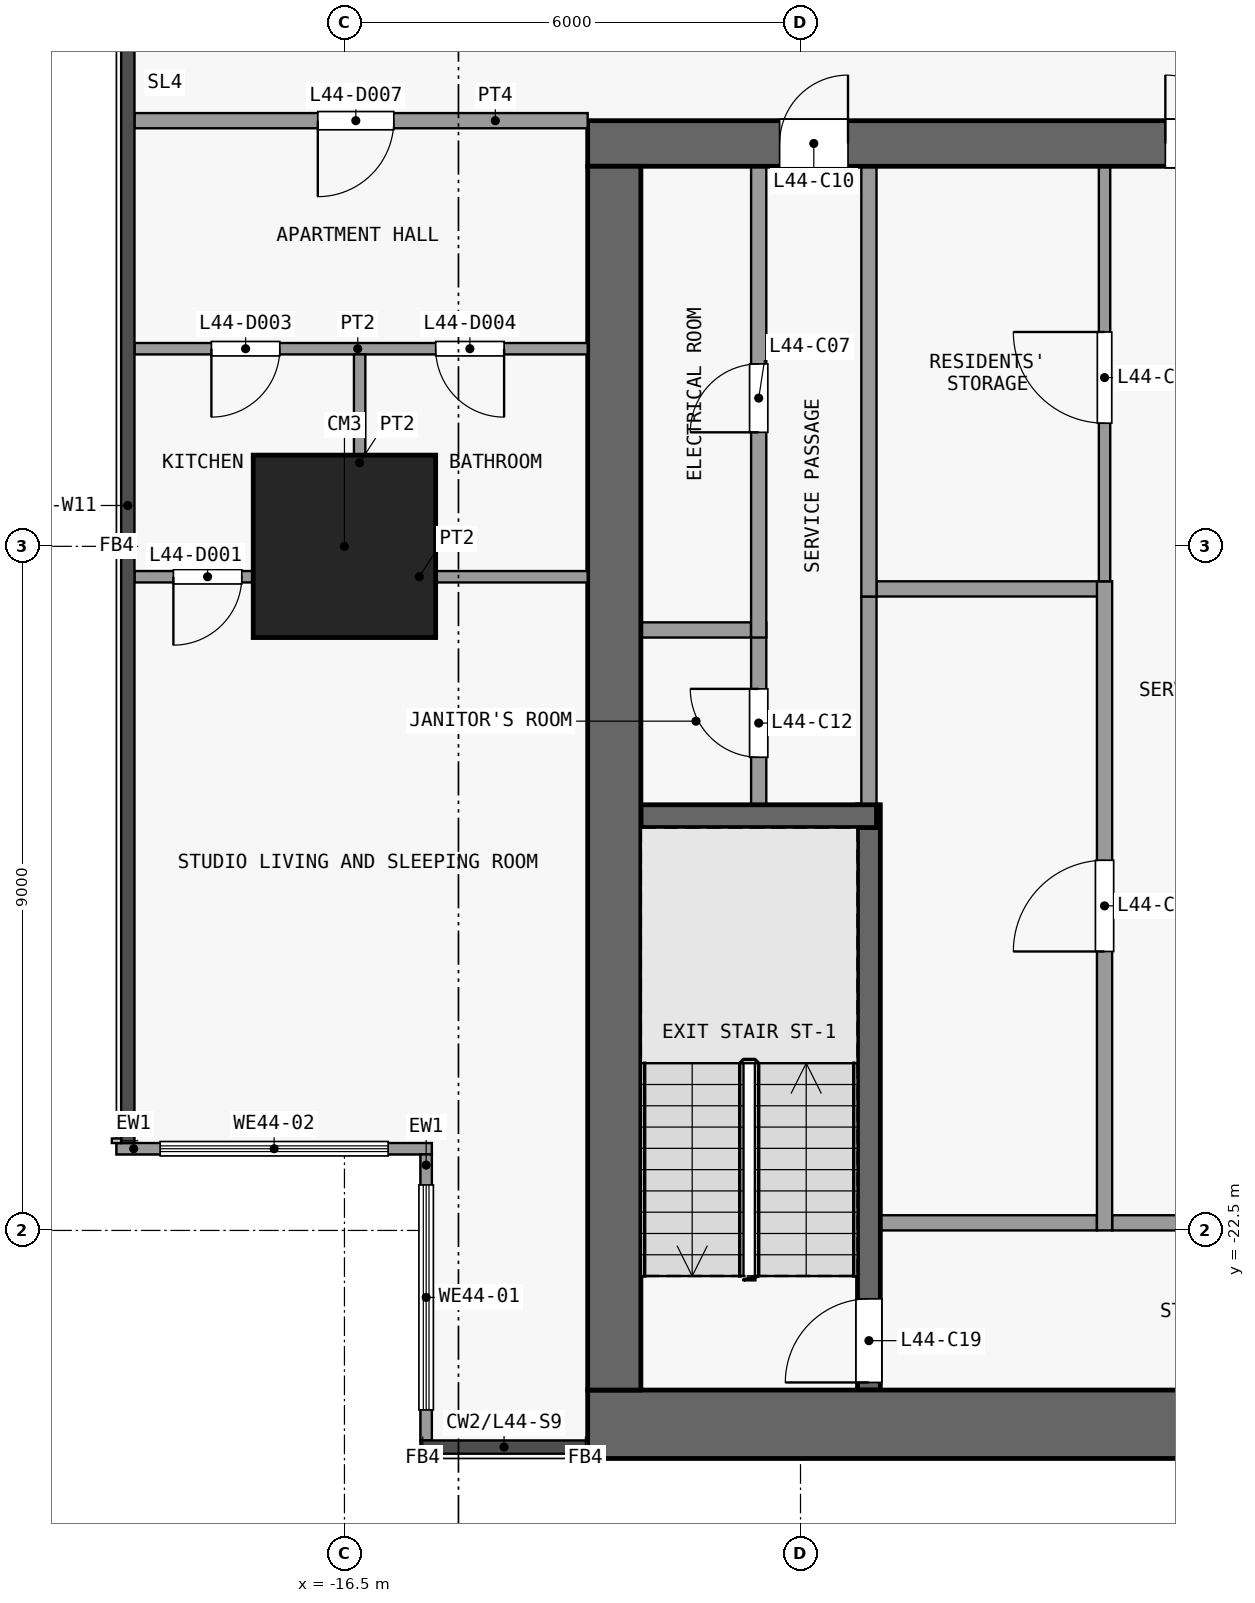
"""IFC4 building model, lengths in metres.
Left out: names, types, materials, properties, quantities, classifications, styles, units other than length and angle.
Written with IfcOpenShell. Run it as: python <this file> out.ifc"""

import sys

from ifc_helpers import new_model, si_unit, direction, frame, frame_2d, origin, origin_2d, place, context, subcontext, project, spatial, rectangle, extrude, element, fill, save


model = new_model("IFC4")
c1 = context("Model", 3, precision=1e-05, world=origin(), true_north=direction((0.0, 1.0)))
c2 = subcontext(c1, "Body", "Model", "MODEL_VIEW")
j1 = project(units=[si_unit("LENGTHUNIT", "METRE"), si_unit("PLANEANGLEUNIT", "RADIAN")], contexts=[c1])
p1 = place(None, origin())
s1 = spatial("IfcSite", under=j1, at=p1, CompositionType="ELEMENT")
p2 = place(p1, origin())
s2 = spatial("IfcBuilding", under=s1, at=p2, CompositionType="ELEMENT")
p3 = place(p2, frame((0.0, 0.0, 178.1)))
s3 = spatial("IfcBuildingStorey", under=s2, at=p3, CompositionType="ELEMENT", Elevation=178.1)
p4 = place(p3, frame((-16.5, -13.5, 0.0), z_axis=(0.0, 0.0, 1.0), x_axis=(1.0, 0.0, 0.0)))
e1 = element("IfcColumn", 1, at=p4, inside=s3, PredefinedType="COLUMN", context=c2, shape_type="SweptSolid", body=[
    extrude(rectangle(XDim=2.4, YDim=2.4, at=origin_2d()), origin(), (0.0, 0.0, 1.0), 3.6),
])
p5 = place(p3, frame((-13.3, -25.05, 0.0), z_axis=(0.0, 0.0, 1.0), x_axis=(1.0, 0.0, 0.0)))
e2 = element("IfcWall", 2, at=p5, inside=s3, PredefinedType="SHEAR", context=c2, shape_type="SweptSolid", body=[
    extrude(rectangle(XDim=26.6, YDim=0.9, at=frame_2d((13.3, 0.0))), origin(), (0.0, 0.0, 1.0), 3.3),
])
p6 = place(p3, frame((-13.3, -8.2, 0.0), z_axis=(0.0, 0.0, 1.0), x_axis=(1.0, 0.0, 0.0)))
e3 = element("IfcWall", 3, at=p6, inside=s3, PredefinedType="SHEAR", context=c2, shape_type="SweptSolid", body=[
    extrude(rectangle(XDim=26.6, YDim=0.6, at=frame_2d((13.3, 0.0))), origin(), (0.0, 0.0, 1.0), 3.3),
])
p7 = place(p6, frame((7.6, 0.0, 0.0)))
e4 = element("IfcOpeningElement", 4, at=p7, cuts=e3, PredefinedType="OPENING", context=c2, shape_type="SweptSolid", body=[
    extrude(rectangle(XDim=1.8, YDim=2.1, at=frame_2d((0.9, 1.05))), frame((0.0, 0.31, 0.0), z_axis=(0.0, -1.0, 0.0), x_axis=(1.0, 0.0, 0.0)), (0.0, 0.0, 1.0), 0.62),
])
p8 = place(p6, frame((17.2, 0.0, 0.0)))
e5 = element("IfcOpeningElement", 5, at=p8, cuts=e3, PredefinedType="OPENING", context=c2, shape_type="SweptSolid", body=[
    extrude(rectangle(XDim=1.8, YDim=2.1, at=frame_2d((0.9, 1.05))), frame((0.0, 0.31, 0.0), z_axis=(0.0, -1.0, 0.0), x_axis=(1.0, 0.0, 0.0)), (0.0, 0.0, 1.0), 0.62),
])
p9 = place(p6, frame((2.525, 0.0, 0.0)))
e6 = element("IfcOpeningElement", 6, at=p9, cuts=e3, PredefinedType="OPENING", context=c2, shape_type="SweptSolid", body=[
    extrude(rectangle(XDim=0.9, YDim=2.1, at=frame_2d((0.45, 1.05))), frame((0.0, 0.31, 0.0), z_axis=(0.0, -1.0, 0.0), x_axis=(1.0, 0.0, 0.0)), (0.0, 0.0, 1.0), 0.62),
])
p10 = place(p6, frame((23.175, 0.0, 0.0)))
e7 = element("IfcOpeningElement", 7, at=p10, cuts=e3, PredefinedType="OPENING", context=c2, shape_type="SweptSolid", body=[
    extrude(rectangle(XDim=0.9, YDim=2.1, at=frame_2d((0.45, 1.05))), frame((0.0, 0.31, 0.0), z_axis=(0.0, -1.0, 0.0), x_axis=(1.0, 0.0, 0.0)), (0.0, 0.0, 1.0), 0.62),
])
p11 = place(p3, frame((-12.95, -24.6, 0.0), z_axis=(0.0, 0.0, 1.0), x_axis=(0.0, 1.0, 0.0)))
e8 = element("IfcWall", 8, at=p11, inside=s3, PredefinedType="SHEAR", context=c2, shape_type="SweptSolid", body=[
    extrude(rectangle(XDim=16.1, YDim=0.7, at=frame_2d((8.05, 0.0))), origin(), (0.0, 0.0, 1.0), 3.3),
])
p12 = place(p3, frame((-9.45, -22.4, 0.0), z_axis=(0.0, 0.0, 1.0), x_axis=(1.0, 0.0, 0.0)))
e9 = element("IfcWall", 9, at=p12, inside=s3, PredefinedType="PARTITIONING", context=c2, shape_type="SweptSolid", body=[
    extrude(rectangle(XDim=2.85, YDim=0.2, at=frame_2d((1.425, 0.0))), origin(), (0.0, 0.0, 1.0), 3.3),
])
p13 = place(p3, frame((-3.25, -22.4, 0.0), z_axis=(0.0, 0.0, 1.0), x_axis=(-1.0, 0.0, 0.0)))
e10 = element("IfcWall", 10, at=p13, inside=s3, PredefinedType="PARTITIONING", context=c2, shape_type="SweptSolid", body=[
    extrude(rectangle(XDim=3.15, YDim=0.2, at=frame_2d((1.575, 0.0))), origin(), (0.0, 0.0, 1.0), 3.3),
])
p14 = place(p13, frame((0.8, 0.0, 0.0)))
e11 = element("IfcOpeningElement", 11, at=p14, cuts=e10, PredefinedType="OPENING", context=c2, shape_type="SweptSolid", body=[
    extrude(rectangle(XDim=1.5, YDim=2.1, at=frame_2d((0.75, 1.05))), frame((0.0, 0.11, 0.0), z_axis=(0.0, -1.0, 0.0), x_axis=(1.0, 0.0, 0.0)), (0.0, 0.0, 1.0), 0.22),
])
p15 = place(p3, frame((-12.6, -17.05, 0.0), z_axis=(0.0, 0.0, 1.0), x_axis=(1.0, 0.0, 0.0)))
e12 = element("IfcWall", 12, at=p15, inside=s3, PredefinedType="SHEAR", context=c2, shape_type="SweptSolid", body=[
    extrude(rectangle(XDim=3.1, YDim=0.3, at=frame_2d((1.55, 0.0))), origin(), (0.0, 0.0, 1.0), 3.3),
])
p16 = place(p3, frame((-12.6, -14.6, 0.0), z_axis=(0.0, 0.0, 1.0), x_axis=(1.0, 0.0, 0.0)))
e13 = element("IfcWall", 13, at=p16, inside=s3, PredefinedType="PARTITIONING", context=c2, shape_type="SweptSolid", body=[
    extrude(rectangle(XDim=1.45, YDim=0.2, at=frame_2d((0.725, 0.0))), origin(), (0.0, 0.0, 1.0), 3.3),
])
p17 = place(p3, frame((-9.5, -14.06, 0.0), z_axis=(0.0, 0.0, 1.0), x_axis=(1.0, 0.0, 0.0)))
e14 = element("IfcWall", 14, at=p17, inside=s3, PredefinedType="PARTITIONING", context=c2, shape_type="SweptSolid", body=[
    extrude(rectangle(XDim=3.075, YDim=0.2, at=frame_2d((1.538, 0.0))), origin(), (0.0, 0.0, 1.0), 3.3),
])
p18 = place(p3, frame((-11.05, -16.9, 0.0), z_axis=(0.0, 0.0, 1.0), x_axis=(0.0, 1.0, 0.0)))
e15 = element("IfcWall", 15, at=p18, inside=s3, PredefinedType="PARTITIONING", context=c2, shape_type="SweptSolid", body=[
    extrude(rectangle(XDim=2.4, YDim=0.2, at=frame_2d((1.2, 0.0))), origin(), (0.0, 0.0, 1.0), 3.3),
])
p19 = place(p18, frame((0.625, 0.0, 0.0)))
e16 = element("IfcOpeningElement", 16, at=p19, cuts=e15, PredefinedType="OPENING", context=c2, shape_type="SweptSolid", body=[
    extrude(rectangle(XDim=0.9, YDim=2.1, at=frame_2d((0.45, 1.05))), frame((0.0, 0.11, 0.0), z_axis=(0.0, -1.0, 0.0), x_axis=(1.0, 0.0, 0.0)), (0.0, 0.0, 1.0), 0.22),
])
p20 = place(p3, frame((-11.05, -14.7, 0.0), z_axis=(0.0, 0.0, 1.0), x_axis=(0.0, 1.0, 0.0)))
e17 = element("IfcWall", 17, at=p20, inside=s3, PredefinedType="PARTITIONING", context=c2, shape_type="SweptSolid", body=[
    extrude(rectangle(XDim=6.2, YDim=0.2, at=frame_2d((3.1, 0.0))), origin(), (0.0, 0.0, 1.0), 3.3),
])
p21 = place(p20, frame((2.7, 0.0, 0.0)))
e18 = element("IfcOpeningElement", 18, at=p21, cuts=e17, PredefinedType="OPENING", context=c2, shape_type="SweptSolid", body=[
    extrude(rectangle(XDim=0.9, YDim=2.1, at=frame_2d((0.45, 1.05))), frame((0.0, 0.11, 0.0), z_axis=(0.0, -1.0, 0.0), x_axis=(1.0, 0.0, 0.0)), (0.0, 0.0, 1.0), 0.22),
])
p22 = place(p3, frame((-9.6, -24.6, 0.0), z_axis=(0.0, 0.0, 1.0), x_axis=(0.0, 1.0, 0.0)))
e19 = element("IfcWall", 19, at=p22, inside=s3, PredefinedType="SHEAR", context=c2, shape_type="SweptSolid", body=[
    extrude(rectangle(XDim=7.7, YDim=0.3, at=frame_2d((3.85, 0.0))), origin(), (0.0, 0.0, 1.0), 3.3),
])
p23 = place(p22, frame((0.1, 0.0, 0.0)))
e20 = element("IfcOpeningElement", 20, at=p23, cuts=e19, PredefinedType="OPENING", context=c2, shape_type="SweptSolid", body=[
    extrude(rectangle(XDim=1.1, YDim=2.1, at=frame_2d((0.55, 1.05))), frame((0.0, 0.16, 0.0), z_axis=(0.0, -1.0, 0.0), x_axis=(1.0, 0.0, 0.0)), (0.0, 0.0, 1.0), 0.32),
])
p24 = place(p3, frame((-9.6, -16.9, 0.0), z_axis=(0.0, 0.0, 1.0), x_axis=(0.0, 1.0, 0.0)))
e21 = element("IfcWall", 21, at=p24, inside=s3, PredefinedType="PARTITIONING", context=c2, shape_type="SweptSolid", body=[
    extrude(rectangle(XDim=2.74, YDim=0.2, at=frame_2d((1.37, 0.0))), origin(), (0.0, 0.0, 1.0), 3.3),
])
p25 = place(p3, frame((-9.6, -14.16, 0.0), z_axis=(0.0, 0.0, 1.0), x_axis=(0.0, 1.0, 0.0)))
e22 = element("IfcWall", 22, at=p25, inside=s3, PredefinedType="PARTITIONING", context=c2, shape_type="SweptSolid", body=[
    extrude(rectangle(XDim=5.66, YDim=0.2, at=frame_2d((2.83, 0.0))), origin(), (0.0, 0.0, 1.0), 3.3),
])
p26 = place(p3, frame((-6.5, -22.5, 0.0), z_axis=(0.0, 0.0, 1.0), x_axis=(0.0, 1.0, 0.0)))
e23 = element("IfcWall", 23, at=p26, inside=s3, PredefinedType="PARTITIONING", context=c2, shape_type="SweptSolid", body=[
    extrude(rectangle(XDim=8.54, YDim=0.2, at=frame_2d((4.27, 0.0))), origin(), (0.0, 0.0, 1.0), 3.3),
])
p27 = place(p26, frame((3.67, 0.0, 0.0)))
e24 = element("IfcOpeningElement", 24, at=p27, cuts=e23, PredefinedType="OPENING", context=c2, shape_type="SweptSolid", body=[
    extrude(rectangle(XDim=1.2, YDim=2.1, at=frame_2d((0.6, 1.05))), frame((0.0, 0.11, 0.0), z_axis=(0.0, -1.0, 0.0), x_axis=(1.0, 0.0, 0.0)), (0.0, 0.0, 1.0), 0.22),
])
p28 = place(p3, frame((-6.5, -13.96, 0.0), z_axis=(0.0, 0.0, 1.0), x_axis=(0.0, 1.0, 0.0)))
e25 = element("IfcWall", 25, at=p28, inside=s3, PredefinedType="PARTITIONING", context=c2, shape_type="SweptSolid", body=[
    extrude(rectangle(XDim=5.46, YDim=0.15, at=frame_2d((2.73, 0.0))), origin(), (0.0, 0.0, 1.0), 3.3),
])
p29 = place(p28, frame((2.08, 0.0, 0.0)))
e26 = element("IfcOpeningElement", 26, at=p29, cuts=e25, PredefinedType="OPENING", context=c2, shape_type="SweptSolid", body=[
    extrude(rectangle(XDim=1.2, YDim=2.1, at=frame_2d((0.6, 1.05))), frame((0.0, 0.085, 0.0), z_axis=(0.0, -1.0, 0.0), x_axis=(1.0, 0.0, 0.0)), (0.0, 0.0, 1.0), 0.17),
])
p30 = place(p3, frame((-15.425, -25.262, 0.0), z_axis=(0.0, 0.0, 1.0), x_axis=(0.0, 1.0, 0.0)))
e27 = element("IfcWall", 27, at=p30, inside=s3, PredefinedType="SOLIDWALL", context=c2, shape_type="SweptSolid", body=[
    extrude(rectangle(XDim=3.762, YDim=0.15, at=frame_2d((1.881, 0.0))), origin(), (0.0, 0.0, 1.0), 3.3),
])
p31 = place(p30, frame((0.401, 0.0, 0.9)))
e28 = element("IfcOpeningElement", 28, at=p31, cuts=e27, PredefinedType="OPENING", context=c2, shape_type="SweptSolid", body=[
    extrude(rectangle(XDim=2.96, YDim=2.4, at=frame_2d((1.48, 1.2))), frame((0.0, 0.085, 0.0), z_axis=(0.0, -1.0, 0.0), x_axis=(1.0, 0.0, 0.0)), (0.0, 0.0, 1.0), 0.17),
])
p32 = place(p3, frame((-15.35, -21.425, 0.0), z_axis=(0.0, 0.0, 1.0), x_axis=(-1.0, 0.0, 0.0)))
e29 = element("IfcWall", 29, at=p32, inside=s3, PredefinedType="SOLIDWALL", context=c2, shape_type="SweptSolid", body=[
    extrude(rectangle(XDim=4.15, YDim=0.15, at=frame_2d((2.075, 0.0))), origin(), (0.0, 0.0, 1.0), 3.3),
])
p33 = place(p32, frame((0.575, 0.0, 0.9)))
e30 = element("IfcOpeningElement", 30, at=p33, cuts=e29, PredefinedType="OPENING", context=c2, shape_type="SweptSolid", body=[
    extrude(rectangle(XDim=3.0, YDim=2.4, at=frame_2d((1.5, 1.2))), frame((0.0, 0.085, 0.0), z_axis=(0.0, -1.0, 0.0), x_axis=(1.0, 0.0, 0.0)), (0.0, 0.0, 1.0), 0.17),
])
p34 = place(p3, frame((-19.262, -13.9, 0.0), z_axis=(0.0, 0.0, 1.0), x_axis=(1.0, 0.0, 0.0)))
e31 = element("IfcWall", 31, at=p34, inside=s3, PredefinedType="PARTITIONING", context=c2, shape_type="SweptSolid", body=[
    extrude(rectangle(XDim=5.962, YDim=0.15, at=frame_2d((2.981, 0.0))), origin(), (0.0, 0.0, 1.0), 3.3),
])
p35 = place(p34, frame((0.512, 0.0, 0.0)))
e32 = element("IfcOpeningElement", 32, at=p35, cuts=e31, PredefinedType="OPENING", context=c2, shape_type="SweptSolid", body=[
    extrude(rectangle(XDim=0.9, YDim=2.1, at=frame_2d((0.45, 1.05))), frame((0.0, 0.085, 0.0), z_axis=(0.0, -1.0, 0.0), x_axis=(1.0, 0.0, 0.0)), (0.0, 0.0, 1.0), 0.17),
])
p36 = place(p3, frame((-19.262, -10.9, 0.0), z_axis=(0.0, 0.0, 1.0), x_axis=(1.0, 0.0, 0.0)))
e33 = element("IfcWall", 33, at=p36, inside=s3, PredefinedType="PARTITIONING", context=c2, shape_type="SweptSolid", body=[
    extrude(rectangle(XDim=5.962, YDim=0.15, at=frame_2d((2.981, 0.0))), origin(), (0.0, 0.0, 1.0), 3.3),
])
p37 = place(p36, frame((1.012, 0.0, 0.0)))
e34 = element("IfcOpeningElement", 34, at=p37, cuts=e33, PredefinedType="OPENING", context=c2, shape_type="SweptSolid", body=[
    extrude(rectangle(XDim=0.9, YDim=2.1, at=frame_2d((0.45, 1.05))), frame((0.0, 0.085, 0.0), z_axis=(0.0, -1.0, 0.0), x_axis=(1.0, 0.0, 0.0)), (0.0, 0.0, 1.0), 0.17),
])
p38 = place(p36, frame((3.963, 0.0, 0.0)))
e35 = element("IfcOpeningElement", 35, at=p38, cuts=e33, PredefinedType="OPENING", context=c2, shape_type="SweptSolid", body=[
    extrude(rectangle(XDim=0.9, YDim=2.1, at=frame_2d((0.45, 1.05))), frame((0.0, 0.085, 0.0), z_axis=(0.0, -1.0, 0.0), x_axis=(1.0, 0.0, 0.0)), (0.0, 0.0, 1.0), 0.17),
])
p39 = place(p3, frame((-19.262, -7.9, 0.0), z_axis=(0.0, 0.0, 1.0), x_axis=(1.0, 0.0, 0.0)))
e36 = element("IfcWall", 36, at=p39, inside=s3, PredefinedType="PARTITIONING", context=c2, shape_type="SweptSolid", body=[
    extrude(rectangle(XDim=5.962, YDim=0.2, at=frame_2d((2.981, 0.0))), origin(), (0.0, 0.0, 1.0), 3.3),
])
p40 = place(p39, frame((2.412, 0.0, 0.0)))
e37 = element("IfcOpeningElement", 37, at=p40, cuts=e36, PredefinedType="OPENING", context=c2, shape_type="SweptSolid", body=[
    extrude(rectangle(XDim=1.0, YDim=2.1, at=frame_2d((0.5, 1.05))), frame((0.0, 0.11, 0.0), z_axis=(0.0, -1.0, 0.0), x_axis=(1.0, 0.0, 0.0)), (0.0, 0.0, 1.0), 0.22),
])
p41 = place(p3, frame((-16.3, -13.825, 0.0), z_axis=(0.0, 0.0, 1.0), x_axis=(0.0, 1.0, 0.0)))
e38 = element("IfcWall", 38, at=p41, inside=s3, PredefinedType="PARTITIONING", context=c2, shape_type="SweptSolid", body=[
    extrude(rectangle(XDim=2.85, YDim=0.15, at=frame_2d((1.425, 0.0))), origin(), (0.0, 0.0, 1.0), 3.3),
])
p42 = place(p7, origin())
e39 = element("IfcDoor", 39, at=p42, inside=s3, OperationType="DOUBLE_DOOR_SINGLE_SWING", PredefinedType="DOOR", context=c2, shape_type="SweptSolid", body=[
    extrude(rectangle(XDim=1.8, YDim=2.1, at=frame_2d((0.9, 1.05))), frame((0.0, 0.025, 0.0), z_axis=(0.0, -1.0, 0.0), x_axis=(1.0, 0.0, 0.0)), (0.0, 0.0, 1.0), 0.05),
])
fill(e4, e39)
p43 = place(p21, origin())
e40 = element("IfcDoor", 40, at=p43, inside=s3, OperationType="SINGLE_SWING_LEFT", PredefinedType="DOOR", context=c2, shape_type="SweptSolid", body=[
    extrude(rectangle(XDim=0.9, YDim=2.1, at=frame_2d((0.45, 1.05))), frame((0.0, 0.025, 0.0), z_axis=(0.0, -1.0, 0.0), x_axis=(1.0, 0.0, 0.0)), (0.0, 0.0, 1.0), 0.05),
])
fill(e18, e40)
p44 = place(p27, origin())
e41 = element("IfcDoor", 41, at=p44, inside=s3, OperationType="SINGLE_SWING_LEFT", PredefinedType="DOOR", context=c2, shape_type="SweptSolid", body=[
    extrude(rectangle(XDim=1.2, YDim=2.1, at=frame_2d((0.6, 1.05))), frame((0.0, 0.025, 0.0), z_axis=(0.0, -1.0, 0.0), x_axis=(1.0, 0.0, 0.0)), (0.0, 0.0, 1.0), 0.05),
])
fill(e24, e41)
p45 = place(p9, origin())
e42 = element("IfcDoor", 42, at=p45, inside=s3, OperationType="SINGLE_SWING_RIGHT", PredefinedType="DOOR", context=c2, shape_type="SweptSolid", body=[
    extrude(rectangle(XDim=0.9, YDim=2.1, at=frame_2d((0.45, 1.05))), frame((0.0, 0.025, 0.0), z_axis=(0.0, -1.0, 0.0), x_axis=(1.0, 0.0, 0.0)), (0.0, 0.0, 1.0), 0.05),
])
fill(e6, e42)
p46 = place(p19, origin())
e43 = element("IfcDoor", 43, at=p46, inside=s3, OperationType="SINGLE_SWING_RIGHT", PredefinedType="DOOR", context=c2, shape_type="SweptSolid", body=[
    extrude(rectangle(XDim=0.9, YDim=2.1, at=frame_2d((0.45, 1.05))), frame((0.0, 0.025, 0.0), z_axis=(0.0, -1.0, 0.0), x_axis=(1.0, 0.0, 0.0)), (0.0, 0.0, 1.0), 0.05),
])
fill(e16, e43)
p47 = place(p29, origin())
e44 = element("IfcDoor", 44, at=p47, inside=s3, OperationType="SINGLE_SWING_RIGHT", PredefinedType="DOOR", context=c2, shape_type="SweptSolid", body=[
    extrude(rectangle(XDim=1.2, YDim=2.1, at=frame_2d((0.6, 1.05))), frame((0.0, 0.025, 0.0), z_axis=(0.0, -1.0, 0.0), x_axis=(1.0, 0.0, 0.0)), (0.0, 0.0, 1.0), 0.05),
])
fill(e26, e44)
p48 = place(p23, origin())
e45 = element("IfcDoor", 45, at=p48, inside=s3, OperationType="SINGLE_SWING_LEFT", PredefinedType="DOOR", context=c2, shape_type="SweptSolid", body=[
    extrude(rectangle(XDim=1.1, YDim=2.1, at=frame_2d((0.55, 1.05))), frame((0.0, 0.025, 0.0), z_axis=(0.0, -1.0, 0.0), x_axis=(1.0, 0.0, 0.0)), (0.0, 0.0, 1.0), 0.05),
])
fill(e20, e45)
p49 = place(p31, origin())
e46 = element("IfcWindow", 46, at=p49, inside=s3, PartitioningType="SINGLE_PANEL", PredefinedType="WINDOW", context=c2, shape_type="SweptSolid", body=[
    extrude(rectangle(XDim=2.96, YDim=2.4, at=frame_2d((1.48, 1.2))), frame((0.0, 0.03, 0.0), z_axis=(0.0, -1.0, 0.0), x_axis=(1.0, 0.0, 0.0)), (0.0, 0.0, 1.0), 0.06),
])
fill(e28, e46)
p50 = place(p33, origin())
e47 = element("IfcWindow", 47, at=p50, inside=s3, PartitioningType="SINGLE_PANEL", PredefinedType="WINDOW", context=c2, shape_type="SweptSolid", body=[
    extrude(rectangle(XDim=3.0, YDim=2.4, at=frame_2d((1.5, 1.2))), frame((0.0, 0.03, 0.0), z_axis=(0.0, -1.0, 0.0), x_axis=(1.0, 0.0, 0.0)), (0.0, 0.0, 1.0), 0.06),
])
fill(e30, e47)
p51 = place(p35, origin())
e48 = element("IfcDoor", 48, at=p51, inside=s3, OperationType="SINGLE_SWING_LEFT", PredefinedType="DOOR", context=c2, shape_type="SweptSolid", body=[
    extrude(rectangle(XDim=0.9, YDim=2.1, at=frame_2d((0.45, 1.05))), frame((0.0, 0.025, 0.0), z_axis=(0.0, -1.0, 0.0), x_axis=(1.0, 0.0, 0.0)), (0.0, 0.0, 1.0), 0.05),
])
fill(e32, e48)
p52 = place(p37, origin())
e49 = element("IfcDoor", 49, at=p52, inside=s3, OperationType="SINGLE_SWING_LEFT", PredefinedType="DOOR", context=c2, shape_type="SweptSolid", body=[
    extrude(rectangle(XDim=0.9, YDim=2.1, at=frame_2d((0.45, 1.05))), frame((0.0, 0.025, 0.0), z_axis=(0.0, -1.0, 0.0), x_axis=(1.0, 0.0, 0.0)), (0.0, 0.0, 1.0), 0.05),
])
fill(e34, e49)
p53 = place(p38, origin())
e50 = element("IfcDoor", 50, at=p53, inside=s3, OperationType="SINGLE_SWING_RIGHT", PredefinedType="DOOR", context=c2, shape_type="SweptSolid", body=[
    extrude(rectangle(XDim=0.9, YDim=2.1, at=frame_2d((0.45, 1.05))), frame((0.0, 0.025, 0.0), z_axis=(0.0, -1.0, 0.0), x_axis=(1.0, 0.0, 0.0)), (0.0, 0.0, 1.0), 0.05),
])
fill(e35, e50)
p54 = place(p40, origin())
e51 = element("IfcDoor", 51, at=p54, inside=s3, OperationType="SINGLE_SWING_LEFT", PredefinedType="DOOR", context=c2, shape_type="SweptSolid", body=[
    extrude(rectangle(XDim=1.0, YDim=2.1, at=frame_2d((0.5, 1.05))), frame((0.0, 0.025, 0.0), z_axis=(0.0, -1.0, 0.0), x_axis=(1.0, 0.0, 0.0)), (0.0, 0.0, 1.0), 0.05),
])
fill(e37, e51)
save(model, sys.argv[1])
